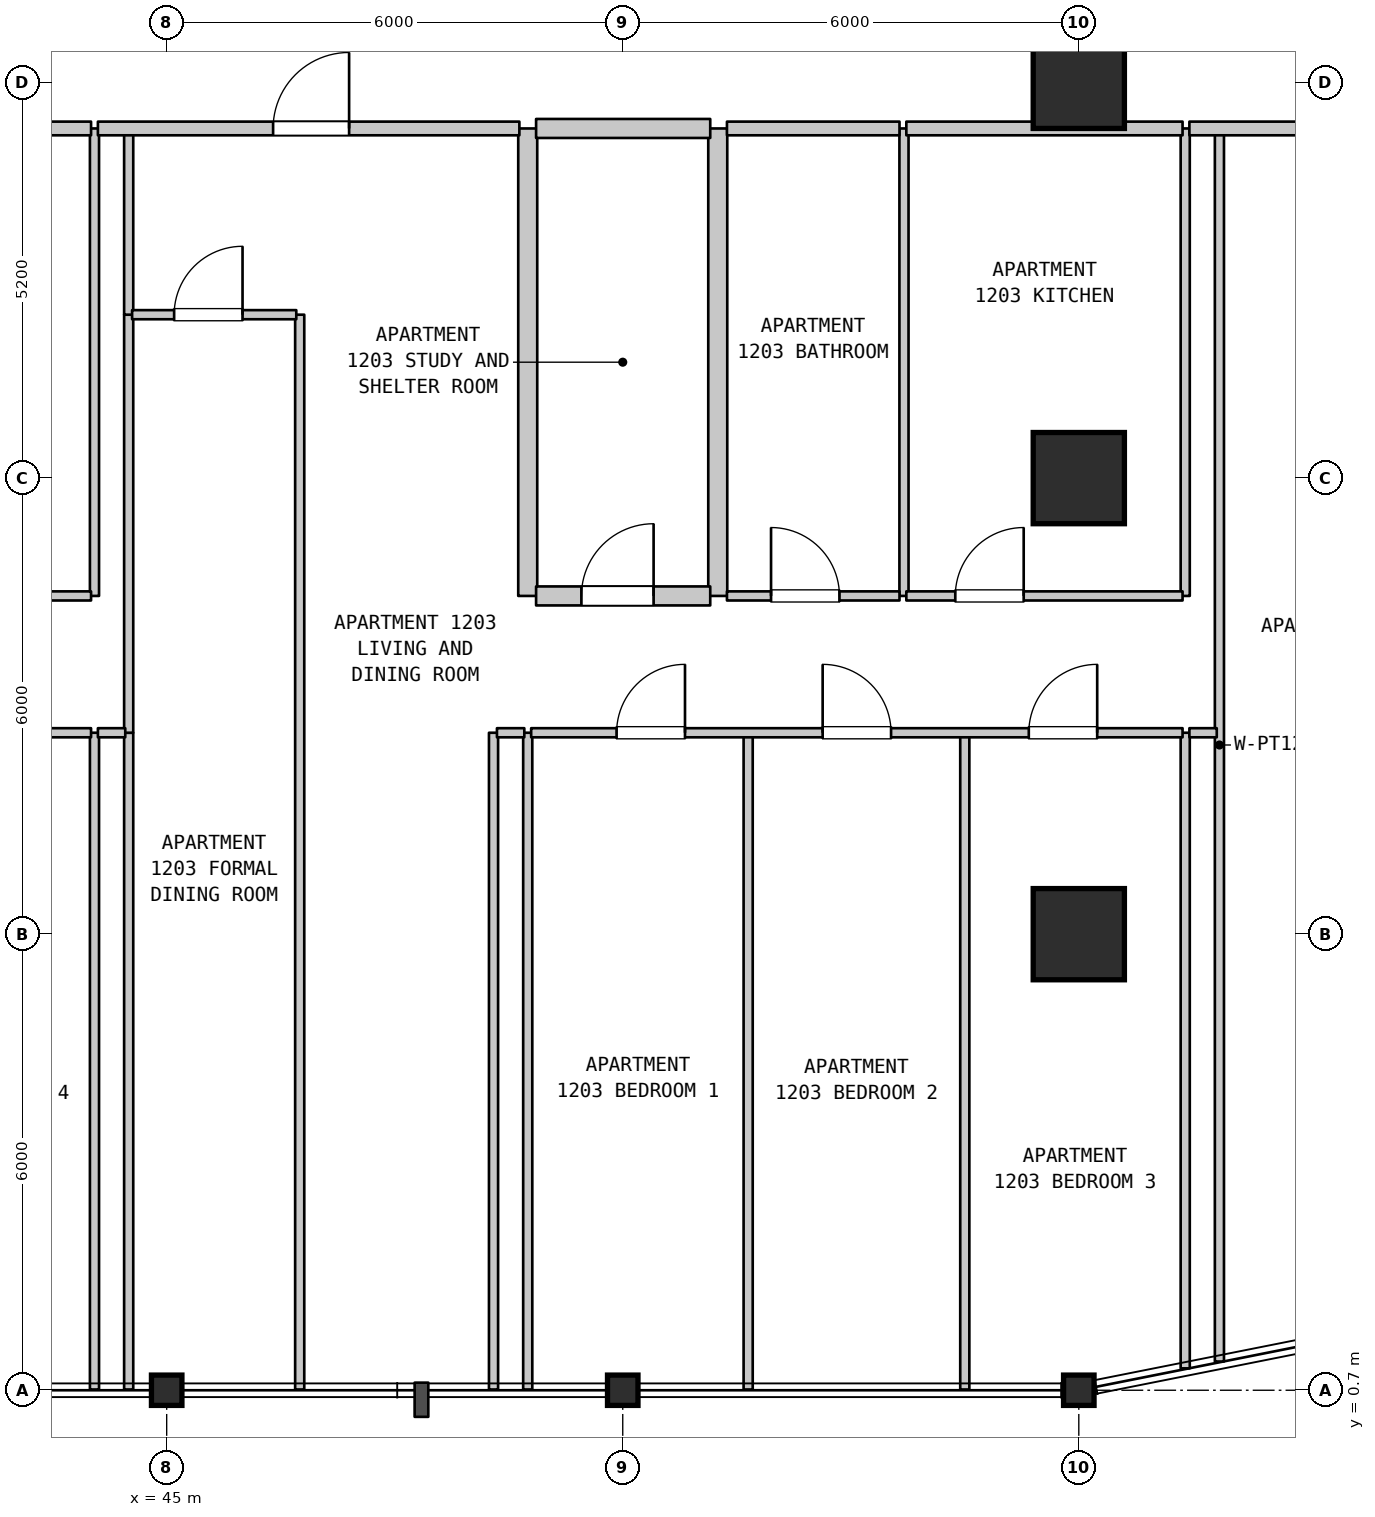
"""IFC4 building model, lengths in metres.
Left out: names, types, materials, properties, quantities, classifications, styles, units other than length and angle.
Written with IfcOpenShell. Run it as: python <this file> out.ifc"""

import sys

from ifc_helpers import new_model, si_unit, direction, frame, frame_2d, origin, origin_2d, place, context, subcontext, project, spatial, rectangle, i_section, extrude, element, fill, save


model = new_model("IFC4")
c1 = context("Model", 3, precision=1e-05, world=origin(), true_north=direction((0.0, 1.0)))
c2 = subcontext(c1, "Body", "Model", "MODEL_VIEW")
j1 = project(units=[si_unit("LENGTHUNIT", "METRE"), si_unit("PLANEANGLEUNIT", "RADIAN")], contexts=[c1])
p1 = place(None, origin())
s1 = spatial("IfcSite", under=j1, at=p1, CompositionType="ELEMENT")
p2 = place(p1, origin())
s2 = spatial("IfcBuilding", under=s1, at=p2, CompositionType="ELEMENT")
p3 = place(p2, frame((0.0, 0.0, 53.6)))
s3 = spatial("IfcBuildingStorey", under=s2, at=p3, CompositionType="ELEMENT", Elevation=53.6)
for number, where, z_axis, x_axis in (
    (1, (45.0, 0.7, 0.0), (0.0, 0.0, 1.0), (1.0, 0.0, 0.0)),
    (2, (51.0, 0.7, 0.0), (0.0, 0.0, 1.0), (1.0, 0.0, 0.0)),
    (3, (57.0, 0.7, 0.0), (0.0, 0.0, 1.0), (1.0, 0.0, 0.0)),
):
    element("IfcColumn", number, at=place(p3, frame(where, z_axis=z_axis, x_axis=x_axis)), inside=s3, PredefinedType="COLUMN", context=c2, shape_type="SweptSolid", body=[
        extrude(i_section(OverallWidth=0.401, OverallDepth=0.399, WebThickness=0.025, FlangeThickness=0.04, FilletRadius=0.015, at=origin_2d()), origin(), (0.0, 0.0, 1.0), 3.7),
    ])
for number, where, z_axis, x_axis in (
    (4, (57.0, 6.7, 0.0), (0.0, 0.0, 1.0), (1.0, 0.0, 0.0)),
    (5, (57.0, 12.7, 0.0), (0.0, 0.0, 1.0), (1.0, 0.0, 0.0)),
    (6, (57.0, 17.9, 0.0), (0.0, 0.0, 1.0), (1.0, 0.0, 0.0)),
):
    element("IfcColumn", number, at=place(p3, frame(where, z_axis=z_axis, x_axis=x_axis)), inside=s3, PredefinedType="COLUMN", context=c2, shape_type="SweptSolid", body=[
        extrude(rectangle(XDim=1.2, YDim=1.2, at=origin_2d()), origin(), (0.0, 0.0, 1.0), 3.7),
    ])
p4 = place(p3, frame((44.05, 0.71, 0.0), z_axis=(0.0, 0.0, 1.0), x_axis=(0.0, 1.0, 0.0)))
e7 = element("IfcWall", 7, at=p4, inside=s3, PredefinedType="PARTITIONING", context=c2, shape_type="SweptSolid", body=[
    extrude(rectangle(XDim=8.64, YDim=0.12, at=frame_2d((4.32, 0.0))), origin(), (0.0, 0.0, 1.0), 3.385),
])
p5 = place(p3, frame((44.05, 11.15, 0.0), z_axis=(0.0, 0.0, 1.0), x_axis=(0.0, 1.0, 0.0)))
e8 = element("IfcWall", 8, at=p5, inside=s3, PredefinedType="PARTITIONING", context=c2, shape_type="SweptSolid", body=[
    extrude(rectangle(XDim=6.15, YDim=0.12, at=frame_2d((3.075, 0.0))), origin(), (0.0, 0.0, 1.0), 3.385),
])
p6 = place(p3, frame((44.5, 0.71, 0.0), z_axis=(0.0, 0.0, 1.0), x_axis=(0.0, 1.0, 0.0)))
e9 = element("IfcWall", 9, at=p6, inside=s3, PredefinedType="PARTITIONING", context=c2, shape_type="SweptSolid", body=[
    extrude(rectangle(XDim=8.64, YDim=0.12, at=frame_2d((4.32, 0.0))), origin(), (0.0, 0.0, 1.0), 3.385),
])
p7 = place(p3, frame((44.5, 9.35, 0.0), z_axis=(0.0, 0.0, 1.0), x_axis=(0.0, 1.0, 0.0)))
e10 = element("IfcWall", 10, at=p7, inside=s3, PredefinedType="PARTITIONING", context=c2, shape_type="SweptSolid", body=[
    extrude(rectangle(XDim=5.5, YDim=0.12, at=frame_2d((2.75, 0.0))), origin(), (0.0, 0.0, 1.0), 3.385),
])
p8 = place(p3, frame((44.5, 14.85, 0.0), z_axis=(0.0, 0.0, 1.0), x_axis=(0.0, 1.0, 0.0)))
e11 = element("IfcWall", 11, at=p8, inside=s3, PredefinedType="PARTITIONING", context=c2, shape_type="SweptSolid", body=[
    extrude(rectangle(XDim=2.45, YDim=0.12, at=frame_2d((1.225, 0.0))), origin(), (0.0, 0.0, 1.0), 3.385),
])
p9 = place(p3, frame((46.75, 0.71, 0.0), z_axis=(0.0, 0.0, 1.0), x_axis=(0.0, 1.0, 0.0)))
e12 = element("IfcWall", 12, at=p9, inside=s3, PredefinedType="PARTITIONING", context=c2, shape_type="SweptSolid", body=[
    extrude(rectangle(XDim=14.14, YDim=0.12, at=frame_2d((7.07, 0.0))), origin(), (0.0, 0.0, 1.0), 3.385),
])
for number, where, z_axis, x_axis in (
    (13, (49.3, 0.71, 0.0), (0.0, 0.0, 1.0), (0.0, 1.0, 0.0)),
    (14, (49.75, 0.71, 0.0), (0.0, 0.0, 1.0), (0.0, 1.0, 0.0)),
):
    element("IfcWall", number, at=place(p3, frame(where, z_axis=z_axis, x_axis=x_axis)), inside=s3, PredefinedType="PARTITIONING", context=c2, shape_type="SweptSolid", body=[
        extrude(rectangle(XDim=8.64, YDim=0.12, at=frame_2d((4.32, 0.0))), origin(), (0.0, 0.0, 1.0), 3.385),
    ])
for number, where, z_axis, x_axis in (
    (15, (49.75, 11.15, 0.0), (0.0, 0.0, 1.0), (0.0, 1.0, 0.0)),
    (16, (52.25, 11.15, 0.0), (0.0, 0.0, 1.0), (0.0, 1.0, 0.0)),
):
    element("IfcWall", number, at=place(p3, frame(where, z_axis=z_axis, x_axis=x_axis)), inside=s3, PredefinedType="STANDARD", context=c2, shape_type="SweptSolid", body=[
        extrude(rectangle(XDim=6.15, YDim=0.25, at=frame_2d((3.075, 0.0))), origin(), (0.0, 0.0, 1.0), 3.385),
    ])
p10 = place(p3, frame((52.65, 0.71, 0.0), z_axis=(0.0, 0.0, 1.0), x_axis=(0.0, 1.0, 0.0)))
e17 = element("IfcWall", 17, at=p10, inside=s3, PredefinedType="PARTITIONING", context=c2, shape_type="SweptSolid", body=[
    extrude(rectangle(XDim=8.64, YDim=0.12, at=frame_2d((4.32, 0.0))), origin(), (0.0, 0.0, 1.0), 3.385),
])
p11 = place(p3, frame((54.7, 11.15, 0.0), z_axis=(0.0, 0.0, 1.0), x_axis=(0.0, 1.0, 0.0)))
e18 = element("IfcWall", 18, at=p11, inside=s3, PredefinedType="PARTITIONING", context=c2, shape_type="SweptSolid", body=[
    extrude(rectangle(XDim=6.15, YDim=0.12, at=frame_2d((3.075, 0.0))), origin(), (0.0, 0.0, 1.0), 3.385),
])
p12 = place(p3, frame((55.5, 0.71, 0.0), z_axis=(0.0, 0.0, 1.0), x_axis=(0.0, 1.0, 0.0)))
e19 = element("IfcWall", 19, at=p12, inside=s3, PredefinedType="PARTITIONING", context=c2, shape_type="SweptSolid", body=[
    extrude(rectangle(XDim=8.64, YDim=0.12, at=frame_2d((4.32, 0.0))), origin(), (0.0, 0.0, 1.0), 3.385),
])
p13 = place(p3, frame((58.4, 0.988, 0.0), z_axis=(0.0, 0.0, 1.0), x_axis=(0.0, 1.0, 0.0)))
e20 = element("IfcWall", 20, at=p13, inside=s3, PredefinedType="PARTITIONING", context=c2, shape_type="SweptSolid", body=[
    extrude(rectangle(XDim=8.362, YDim=0.12, at=frame_2d((4.181, 0.0))), origin(), (0.0, 0.0, 1.0), 3.385),
])
p14 = place(p3, frame((58.4, 11.15, 0.0), z_axis=(0.0, 0.0, 1.0), x_axis=(0.0, 1.0, 0.0)))
e21 = element("IfcWall", 21, at=p14, inside=s3, PredefinedType="PARTITIONING", context=c2, shape_type="SweptSolid", body=[
    extrude(rectangle(XDim=6.15, YDim=0.12, at=frame_2d((3.075, 0.0))), origin(), (0.0, 0.0, 1.0), 3.385),
])
p15 = place(p3, frame((58.85, 1.078, 0.0), z_axis=(0.0, 0.0, 1.0), x_axis=(0.0, 1.0, 0.0)))
e22 = element("IfcWall", 22, at=p15, inside=s3, PredefinedType="PARTITIONING", context=c2, shape_type="SweptSolid", body=[
    extrude(rectangle(XDim=16.222, YDim=0.12, at=frame_2d((8.111, 0.0))), origin(), (0.0, 0.0, 1.0), 3.385),
])
p16 = place(p3, frame((32.895, 9.35, 0.0), z_axis=(0.0, 0.0, 1.0), x_axis=(1.0, 0.0, 0.0)))
e23 = element("IfcWall", 23, at=p16, inside=s3, PredefinedType="PARTITIONING", context=c2, shape_type="SweptSolid", body=[
    extrude(rectangle(XDim=11.11, YDim=0.12, at=frame_2d((5.555, 0.0))), origin(), (0.0, 0.0, 1.0), 3.385),
])
p17 = place(p16, frame((1.006, 0.0, 0.0)))
e24 = element("IfcOpeningElement", 24, at=p17, cuts=e23, PredefinedType="OPENING", context=c2, shape_type="SweptSolid", body=[
    extrude(rectangle(XDim=0.9, YDim=2.15, at=frame_2d((0.45, 1.075))), frame((0.0, 0.07, 0.0), z_axis=(0.0, -1.0, 0.0), x_axis=(1.0, 0.0, 0.0)), (0.0, 0.0, 1.0), 0.14),
])
p18 = place(p16, frame((3.705, 0.0, 0.0)))
e25 = element("IfcOpeningElement", 25, at=p18, cuts=e23, PredefinedType="OPENING", context=c2, shape_type="SweptSolid", body=[
    extrude(rectangle(XDim=0.9, YDim=2.15, at=frame_2d((0.45, 1.075))), frame((0.0, 0.07, 0.0), z_axis=(0.0, -1.0, 0.0), x_axis=(1.0, 0.0, 0.0)), (0.0, 0.0, 1.0), 0.14),
])
p19 = place(p16, frame((6.505, 0.0, 0.0)))
e26 = element("IfcOpeningElement", 26, at=p19, cuts=e23, PredefinedType="OPENING", context=c2, shape_type="SweptSolid", body=[
    extrude(rectangle(XDim=0.9, YDim=2.15, at=frame_2d((0.45, 1.075))), frame((0.0, 0.07, 0.0), z_axis=(0.0, -1.0, 0.0), x_axis=(1.0, 0.0, 0.0)), (0.0, 0.0, 1.0), 0.14),
])
p20 = place(p16, frame((9.056, 0.0, 0.0)))
e27 = element("IfcOpeningElement", 27, at=p20, cuts=e23, PredefinedType="OPENING", context=c2, shape_type="SweptSolid", body=[
    extrude(rectangle(XDim=0.9, YDim=2.15, at=frame_2d((0.45, 1.075))), frame((0.0, 0.07, 0.0), z_axis=(0.0, -1.0, 0.0), x_axis=(1.0, 0.0, 0.0)), (0.0, 0.0, 1.0), 0.14),
])
for number, where, z_axis, x_axis in (
    (28, (44.095, 9.35, 0.0), (0.0, 0.0, 1.0), (1.0, 0.0, 0.0)),
    (29, (49.345, 9.35, 0.0), (0.0, 0.0, 1.0), (1.0, 0.0, 0.0)),
):
    element("IfcWall", number, at=place(p3, frame(where, z_axis=z_axis, x_axis=x_axis)), inside=s3, PredefinedType="PARTITIONING", context=c2, shape_type="SweptSolid", body=[
        extrude(rectangle(XDim=0.36, YDim=0.12, at=frame_2d((0.18, 0.0))), origin(), (0.0, 0.0, 1.0), 3.385),
    ])
p21 = place(p3, frame((49.795, 9.35, 0.0), z_axis=(0.0, 0.0, 1.0), x_axis=(1.0, 0.0, 0.0)))
e30 = element("IfcWall", 30, at=p21, inside=s3, PredefinedType="PARTITIONING", context=c2, shape_type="SweptSolid", body=[
    extrude(rectangle(XDim=8.57, YDim=0.12, at=frame_2d((4.285, 0.0))), origin(), (0.0, 0.0, 1.0), 3.385),
])
p22 = place(p21, frame((1.124, 0.0, 0.0)))
e31 = element("IfcOpeningElement", 31, at=p22, cuts=e30, PredefinedType="OPENING", context=c2, shape_type="SweptSolid", body=[
    extrude(rectangle(XDim=0.9, YDim=2.15, at=frame_2d((0.45, 1.075))), frame((0.0, 0.07, 0.0), z_axis=(0.0, -1.0, 0.0), x_axis=(1.0, 0.0, 0.0)), (0.0, 0.0, 1.0), 0.14),
])
p23 = place(p21, frame((3.835, 0.0, 0.0)))
e32 = element("IfcOpeningElement", 32, at=p23, cuts=e30, PredefinedType="OPENING", context=c2, shape_type="SweptSolid", body=[
    extrude(rectangle(XDim=0.9, YDim=2.15, at=frame_2d((0.45, 1.075))), frame((0.0, 0.07, 0.0), z_axis=(0.0, -1.0, 0.0), x_axis=(1.0, 0.0, 0.0)), (0.0, 0.0, 1.0), 0.14),
])
p24 = place(p21, frame((6.547, 0.0, 0.0)))
e33 = element("IfcOpeningElement", 33, at=p24, cuts=e30, PredefinedType="OPENING", context=c2, shape_type="SweptSolid", body=[
    extrude(rectangle(XDim=0.9, YDim=2.15, at=frame_2d((0.45, 1.075))), frame((0.0, 0.07, 0.0), z_axis=(0.0, -1.0, 0.0), x_axis=(1.0, 0.0, 0.0)), (0.0, 0.0, 1.0), 0.14),
])
p25 = place(p3, frame((58.455, 9.35, 0.0), z_axis=(0.0, 0.0, 1.0), x_axis=(1.0, 0.0, 0.0)))
e34 = element("IfcWall", 34, at=p25, inside=s3, PredefinedType="PARTITIONING", context=c2, shape_type="SweptSolid", body=[
    extrude(rectangle(XDim=0.36, YDim=0.12, at=frame_2d((0.18, 0.0))), origin(), (0.0, 0.0, 1.0), 3.385),
])
p26 = place(p3, frame((40.959, 11.15, 0.0), z_axis=(0.0, 0.0, 1.0), x_axis=(1.0, 0.0, 0.0)))
e35 = element("IfcWall", 35, at=p26, inside=s3, PredefinedType="PARTITIONING", context=c2, shape_type="SweptSolid", body=[
    extrude(rectangle(XDim=3.046, YDim=0.12, at=frame_2d((1.523, 0.0))), origin(), (0.0, 0.0, 1.0), 3.385),
])
p27 = place(p26, frame((1.073, 0.0, 0.0)))
e36 = element("IfcOpeningElement", 36, at=p27, cuts=e35, PredefinedType="OPENING", context=c2, shape_type="SweptSolid", body=[
    extrude(rectangle(XDim=0.9, YDim=2.1, at=frame_2d((0.45, 1.05))), frame((0.0, 0.07, 0.0), z_axis=(0.0, -1.0, 0.0), x_axis=(1.0, 0.0, 0.0)), (0.0, 0.0, 1.0), 0.14),
])
p28 = place(p3, frame((49.86, 11.15, 0.0), z_axis=(0.0, 0.0, 1.0), x_axis=(1.0, 0.0, 0.0)))
e37 = element("IfcWall", 37, at=p28, inside=s3, PredefinedType="STANDARD", context=c2, shape_type="SweptSolid", body=[
    extrude(rectangle(XDim=2.291, YDim=0.25, at=frame_2d((1.146, 0.0))), origin(), (0.0, 0.0, 1.0), 3.385),
])
p29 = place(p28, frame((0.596, 0.0, 0.0)))
e38 = element("IfcOpeningElement", 38, at=p29, cuts=e37, PredefinedType="OPENING", context=c2, shape_type="SweptSolid", body=[
    extrude(rectangle(XDim=0.95, YDim=2.15, at=frame_2d((0.475, 1.075))), frame((0.0, 0.135, 0.0), z_axis=(0.0, -1.0, 0.0), x_axis=(1.0, 0.0, 0.0)), (0.0, 0.0, 1.0), 0.27),
])
p30 = place(p3, frame((52.371, 11.15, 0.0), z_axis=(0.0, 0.0, 1.0), x_axis=(1.0, 0.0, 0.0)))
e39 = element("IfcWall", 39, at=p30, inside=s3, PredefinedType="PARTITIONING", context=c2, shape_type="SweptSolid", body=[
    extrude(rectangle(XDim=2.27, YDim=0.12, at=frame_2d((1.135, 0.0))), origin(), (0.0, 0.0, 1.0), 3.385),
])
p31 = place(p30, frame((0.58, 0.0, 0.0)))
e40 = element("IfcOpeningElement", 40, at=p31, cuts=e39, PredefinedType="OPENING", context=c2, shape_type="SweptSolid", body=[
    extrude(rectangle(XDim=0.9, YDim=2.1, at=frame_2d((0.45, 1.05))), frame((0.0, 0.07, 0.0), z_axis=(0.0, -1.0, 0.0), x_axis=(1.0, 0.0, 0.0)), (0.0, 0.0, 1.0), 0.14),
])
p32 = place(p3, frame((54.731, 11.15, 0.0), z_axis=(0.0, 0.0, 1.0), x_axis=(1.0, 0.0, 0.0)))
e41 = element("IfcWall", 41, at=p32, inside=s3, PredefinedType="PARTITIONING", context=c2, shape_type="SweptSolid", body=[
    extrude(rectangle(XDim=3.634, YDim=0.12, at=frame_2d((1.817, 0.0))), origin(), (0.0, 0.0, 1.0), 3.385),
])
p33 = place(p32, frame((0.644, 0.0, 0.0)))
e42 = element("IfcOpeningElement", 42, at=p33, cuts=e41, PredefinedType="OPENING", context=c2, shape_type="SweptSolid", body=[
    extrude(rectangle(XDim=0.9, YDim=2.15, at=frame_2d((0.45, 1.075))), frame((0.0, 0.07, 0.0), z_axis=(0.0, -1.0, 0.0), x_axis=(1.0, 0.0, 0.0)), (0.0, 0.0, 1.0), 0.14),
])
p34 = place(p3, frame((44.545, 14.85, 0.0), z_axis=(0.0, 0.0, 1.0), x_axis=(1.0, 0.0, 0.0)))
e43 = element("IfcWall", 43, at=p34, inside=s3, PredefinedType="PARTITIONING", context=c2, shape_type="SweptSolid", body=[
    extrude(rectangle(XDim=2.16, YDim=0.12, at=frame_2d((1.08, 0.0))), origin(), (0.0, 0.0, 1.0), 3.385),
])
p35 = place(p34, frame((0.553, 0.0, 0.0)))
e44 = element("IfcOpeningElement", 44, at=p35, cuts=e43, PredefinedType="OPENING", context=c2, shape_type="SweptSolid", body=[
    extrude(rectangle(XDim=0.9, YDim=2.15, at=frame_2d((0.45, 1.075))), frame((0.0, 0.07, 0.0), z_axis=(0.0, -1.0, 0.0), x_axis=(1.0, 0.0, 0.0)), (0.0, 0.0, 1.0), 0.14),
])
p36 = place(p3, frame((40.959, 17.3, 0.0), z_axis=(0.0, 0.0, 1.0), x_axis=(1.0, 0.0, 0.0)))
e45 = element("IfcWall", 45, at=p36, inside=s3, PredefinedType="STANDARD", context=c2, shape_type="SweptSolid", body=[
    extrude(rectangle(XDim=3.046, YDim=0.18, at=frame_2d((1.523, 0.0))), origin(), (0.0, 0.0, 1.0), 3.385),
])
p37 = place(p3, frame((44.095, 17.3, 0.0), z_axis=(0.0, 0.0, 1.0), x_axis=(1.0, 0.0, 0.0)))
e46 = element("IfcWall", 46, at=p37, inside=s3, PredefinedType="STANDARD", context=c2, shape_type="SweptSolid", body=[
    extrude(rectangle(XDim=5.545, YDim=0.18, at=frame_2d((2.772, 0.0))), origin(), (0.0, 0.0, 1.0), 3.385),
])
p38 = place(p37, frame((2.305, 0.0, 0.0)))
e47 = element("IfcOpeningElement", 47, at=p38, cuts=e46, PredefinedType="OPENING", context=c2, shape_type="SweptSolid", body=[
    extrude(rectangle(XDim=1.0, YDim=2.15, at=frame_2d((0.5, 1.075))), frame((0.0, 0.1, 0.0), z_axis=(0.0, -1.0, 0.0), x_axis=(1.0, 0.0, 0.0)), (0.0, 0.0, 1.0), 0.2),
])
p39 = place(p3, frame((49.86, 17.3, 0.0), z_axis=(0.0, 0.0, 1.0), x_axis=(1.0, 0.0, 0.0)))
e48 = element("IfcWall", 48, at=p39, inside=s3, PredefinedType="STANDARD", context=c2, shape_type="SweptSolid", body=[
    extrude(rectangle(XDim=2.291, YDim=0.25, at=frame_2d((1.146, 0.0))), origin(), (0.0, 0.0, 1.0), 3.385),
])
p40 = place(p3, frame((52.371, 17.3, 0.0), z_axis=(0.0, 0.0, 1.0), x_axis=(1.0, 0.0, 0.0)))
e49 = element("IfcWall", 49, at=p40, inside=s3, PredefinedType="STANDARD", context=c2, shape_type="SweptSolid", body=[
    extrude(rectangle(XDim=2.27, YDim=0.18, at=frame_2d((1.135, 0.0))), origin(), (0.0, 0.0, 1.0), 3.385),
])
p41 = place(p3, frame((54.731, 17.3, 0.0), z_axis=(0.0, 0.0, 1.0), x_axis=(1.0, 0.0, 0.0)))
e50 = element("IfcWall", 50, at=p41, inside=s3, PredefinedType="STANDARD", context=c2, shape_type="SweptSolid", body=[
    extrude(rectangle(XDim=3.634, YDim=0.18, at=frame_2d((1.817, 0.0))), origin(), (0.0, 0.0, 1.0), 3.385),
])
p42 = place(p3, frame((58.455, 17.3, 0.0), z_axis=(0.0, 0.0, 1.0), x_axis=(1.0, 0.0, 0.0)))
e51 = element("IfcWall", 51, at=p42, inside=s3, PredefinedType="STANDARD", context=c2, shape_type="SweptSolid", body=[
    extrude(rectangle(XDim=4.65, YDim=0.18, at=frame_2d((2.325, 0.0))), origin(), (0.0, 0.0, 1.0), 3.385),
])
p43 = place(p42, frame((2.025, 0.0, 0.0)))
e52 = element("IfcOpeningElement", 52, at=p43, cuts=e51, PredefinedType="OPENING", context=c2, shape_type="SweptSolid", body=[
    extrude(rectangle(XDim=1.0, YDim=2.15, at=frame_2d((0.5, 1.075))), frame((0.0, 0.1, 0.0), z_axis=(0.0, -1.0, 0.0), x_axis=(1.0, 0.0, 0.0)), (0.0, 0.0, 1.0), 0.2),
])
p44 = place(p22, origin())
e53 = element("IfcDoor", 53, at=p44, inside=s3, OperationType="SINGLE_SWING_RIGHT", PredefinedType="DOOR", context=c2, shape_type="SweptSolid", body=[
    extrude(rectangle(XDim=0.9, YDim=2.15, at=frame_2d((0.45, 1.075))), frame((0.0, 0.025, 0.0), z_axis=(0.0, -1.0, 0.0), x_axis=(1.0, 0.0, 0.0)), (0.0, 0.0, 1.0), 0.05),
])
fill(e31, e53)
p45 = place(p23, origin())
e54 = element("IfcDoor", 54, at=p45, inside=s3, OperationType="SINGLE_SWING_LEFT", PredefinedType="DOOR", context=c2, shape_type="SweptSolid", body=[
    extrude(rectangle(XDim=0.9, YDim=2.15, at=frame_2d((0.45, 1.075))), frame((0.0, 0.025, 0.0), z_axis=(0.0, -1.0, 0.0), x_axis=(1.0, 0.0, 0.0)), (0.0, 0.0, 1.0), 0.05),
])
fill(e32, e54)
p46 = place(p24, origin())
e55 = element("IfcDoor", 55, at=p46, inside=s3, OperationType="SINGLE_SWING_RIGHT", PredefinedType="DOOR", context=c2, shape_type="SweptSolid", body=[
    extrude(rectangle(XDim=0.9, YDim=2.15, at=frame_2d((0.45, 1.075))), frame((0.0, 0.025, 0.0), z_axis=(0.0, -1.0, 0.0), x_axis=(1.0, 0.0, 0.0)), (0.0, 0.0, 1.0), 0.05),
])
fill(e33, e55)
p47 = place(p29, origin())
e56 = element("IfcDoor", 56, at=p47, inside=s3, OperationType="SINGLE_SWING_RIGHT", PredefinedType="DOOR", context=c2, shape_type="SweptSolid", body=[
    extrude(rectangle(XDim=0.95, YDim=2.15, at=frame_2d((0.475, 1.075))), frame((0.0, 0.025, 0.0), z_axis=(0.0, -1.0, 0.0), x_axis=(1.0, 0.0, 0.0)), (0.0, 0.0, 1.0), 0.05),
])
fill(e38, e56)
p48 = place(p31, origin())
e57 = element("IfcDoor", 57, at=p48, inside=s3, OperationType="SINGLE_SWING_LEFT", PredefinedType="DOOR", context=c2, shape_type="SweptSolid", body=[
    extrude(rectangle(XDim=0.9, YDim=2.1, at=frame_2d((0.45, 1.05))), frame((0.0, 0.025, 0.0), z_axis=(0.0, -1.0, 0.0), x_axis=(1.0, 0.0, 0.0)), (0.0, 0.0, 1.0), 0.05),
])
fill(e40, e57)
p49 = place(p33, origin())
e58 = element("IfcDoor", 58, at=p49, inside=s3, OperationType="SINGLE_SWING_RIGHT", PredefinedType="DOOR", context=c2, shape_type="SweptSolid", body=[
    extrude(rectangle(XDim=0.9, YDim=2.15, at=frame_2d((0.45, 1.075))), frame((0.0, 0.025, 0.0), z_axis=(0.0, -1.0, 0.0), x_axis=(1.0, 0.0, 0.0)), (0.0, 0.0, 1.0), 0.05),
])
fill(e42, e58)
p50 = place(p35, origin())
e59 = element("IfcDoor", 59, at=p50, inside=s3, OperationType="SINGLE_SWING_RIGHT", PredefinedType="DOOR", context=c2, shape_type="SweptSolid", body=[
    extrude(rectangle(XDim=0.9, YDim=2.15, at=frame_2d((0.45, 1.075))), frame((0.0, 0.025, 0.0), z_axis=(0.0, -1.0, 0.0), x_axis=(1.0, 0.0, 0.0)), (0.0, 0.0, 1.0), 0.05),
])
fill(e44, e59)
p51 = place(p38, origin())
e60 = element("IfcDoor", 60, at=p51, inside=s3, OperationType="SINGLE_SWING_RIGHT", PredefinedType="DOOR", context=c2, shape_type="SweptSolid", body=[
    extrude(rectangle(XDim=1.0, YDim=2.15, at=frame_2d((0.5, 1.075))), frame((0.0, 0.025, 0.0), z_axis=(0.0, -1.0, 0.0), x_axis=(1.0, 0.0, 0.0)), (0.0, 0.0, 1.0), 0.05),
])
fill(e47, e60)
save(model, sys.argv[1])
